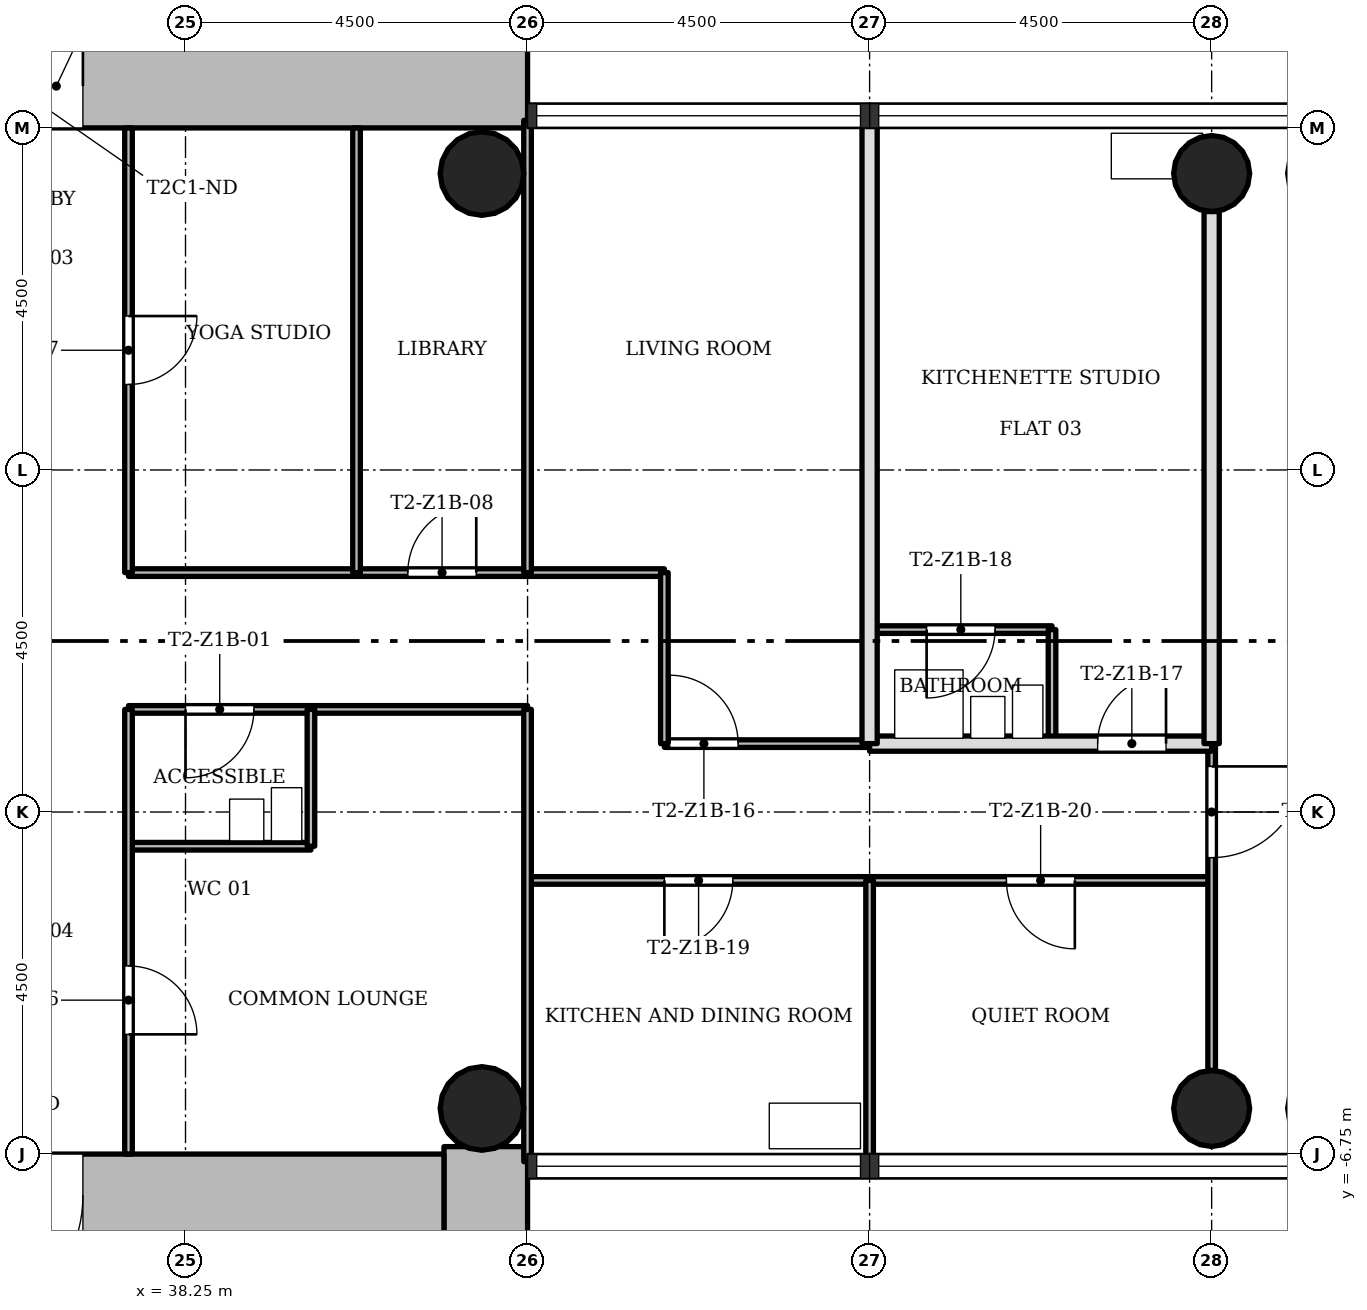
"""IFC4 building model, lengths in metres.
Left out: names, types, materials, properties, quantities, classifications, styles, units other than length and angle.
Written with IfcOpenShell. Run it as: python <this file> out.ifc"""

import sys

from ifc_helpers import new_model, si_unit, direction, frame, frame_2d, origin, origin_2d, place, context, subcontext, project, spatial, rectangle, hollow_circle, extrude, element, fill, save


model = new_model("IFC4")
c1 = context("Model", 3, precision=1e-05, world=origin(), true_north=direction((0.0, 1.0)))
c2 = subcontext(c1, "Body", "Model", "MODEL_VIEW")
j1 = project(units=[si_unit("LENGTHUNIT", "METRE"), si_unit("PLANEANGLEUNIT", "RADIAN")], contexts=[c1])
p1 = place(None, origin())
s1 = spatial("IfcSite", under=j1, at=p1, CompositionType="ELEMENT")
p2 = place(p1, origin())
s2 = spatial("IfcBuilding", under=s1, at=p2, CompositionType="ELEMENT")
p3 = place(p2, frame((0.0, 0.0, 41.5)))
s3 = spatial("IfcBuildingStorey", under=s2, at=p3, CompositionType="ELEMENT", Elevation=41.5)
p4 = place(p3, frame((30.35, 7.3, 0.0), z_axis=(0.0, 0.0, 1.0), x_axis=(1.0, 0.0, 0.0)))
e1 = element("IfcWall", 1, at=p4, inside=s3, PredefinedType="SHEAR", context=c2, shape_type="SweptSolid", body=[
    extrude(rectangle(XDim=12.4, YDim=1.1, at=frame_2d((6.2, 0.0))), origin(), (0.0, 0.0, 1.0), 3.4),
])
p5 = place(p4, frame((4.75, 0.0, 0.0)))
e2 = element("IfcOpeningElement", 2, at=p5, cuts=e1, PredefinedType="OPENING", context=c2, shape_type="SweptSolid", body=[
    extrude(rectangle(XDim=1.8, YDim=2.1, at=frame_2d((0.9, 1.05))), frame((0.0, 0.56, 0.0), z_axis=(0.0, -1.0, 0.0), x_axis=(1.0, 0.0, 0.0)), (0.0, 0.0, 1.0), 1.12),
])
p6 = place(p3, frame((42.2, -15.248, 0.0), z_axis=(0.0, 0.0, 1.0), x_axis=(0.0, 1.0, 0.0)))
e3 = element("IfcWall", 3, at=p6, inside=s3, PredefinedType="SHEAR", context=c2, shape_type="SweptSolid", body=[
    extrude(rectangle(XDim=8.596, YDim=1.1, at=frame_2d((4.298, 0.0))), origin(), (0.0, 0.0, 1.0), 3.4),
])
p7 = place(p3, frame((41.65, -7.3, 0.0), z_axis=(0.0, 0.0, 1.0), x_axis=(-1.0, 0.0, 0.0)))
e4 = element("IfcWall", 4, at=p7, inside=s3, PredefinedType="SHEAR", context=c2, shape_type="SweptSolid", body=[
    extrude(rectangle(XDim=12.4, YDim=1.1, at=frame_2d((6.2, 0.0))), origin(), (0.0, 0.0, 1.0), 3.4),
])
p8 = place(p7, frame((4.75, 0.0, 0.0)))
e5 = element("IfcOpeningElement", 5, at=p8, cuts=e4, PredefinedType="OPENING", context=c2, shape_type="SweptSolid", body=[
    extrude(rectangle(XDim=1.8, YDim=2.1, at=frame_2d((0.9, 1.05))), frame((0.0, 0.56, 0.0), z_axis=(0.0, -1.0, 0.0), x_axis=(1.0, 0.0, 0.0)), (0.0, 0.0, 1.0), 1.12),
])
for number, where, z_axis, x_axis in (
    (6, (51.75, -6.15, 0.0), (0.0, 0.0, 1.0), (1.0, 0.0, 0.0)),
    (7, (51.75, 6.15, 0.0), (0.0, 0.0, 1.0), (1.0, 0.0, 0.0)),
):
    element("IfcColumn", number, at=place(p3, frame(where, z_axis=z_axis, x_axis=x_axis)), inside=s3, PredefinedType="COLUMN", context=c2, shape_type="SweptSolid", body=[
        extrude(hollow_circle(Radius=0.5, WallThickness=0.036, at=origin_2d()), origin(), (0.0, 0.0, 1.0), 3.4),
    ])
for number, where, z_axis, x_axis in (
    (8, (42.15, -6.15, 0.0), (0.0, 0.0, 1.0), (1.0, 0.0, 0.0)),
    (9, (42.15, 6.15, 0.0), (0.0, 0.0, 1.0), (1.0, 0.0, 0.0)),
):
    element("IfcColumn", number, at=place(p3, frame(where, z_axis=z_axis, x_axis=x_axis)), inside=s3, PredefinedType="COLUMN", context=c2, shape_type="SweptSolid", body=[
        extrude(hollow_circle(Radius=0.55, WallThickness=0.04, at=origin_2d()), origin(), (0.0, 0.0, 1.0), 3.4),
    ])
p9 = place(p3, frame((51.75, -3.15, 0.0), z_axis=(0.0, 0.0, 1.0), x_axis=(-1.0, 0.0, 0.0)))
e10 = element("IfcWall", 10, at=p9, inside=s3, PredefinedType="PARTITIONING", context=c2, shape_type="SweptSolid", body=[
    extrude(rectangle(XDim=9.0, YDim=0.1, at=frame_2d((4.5, 0.0))), origin(), (0.0, 0.0, 1.0), 3.0),
])
p10 = place(p9, frame((6.3, 0.0, 0.0)))
e11 = element("IfcOpeningElement", 11, at=p10, cuts=e10, PredefinedType="OPENING", context=c2, shape_type="SweptSolid", body=[
    extrude(rectangle(XDim=0.9, YDim=2.1, at=frame_2d((0.45, 1.05))), frame((0.0, 0.06, 0.0), z_axis=(0.0, -1.0, 0.0), x_axis=(1.0, 0.0, 0.0)), (0.0, 0.0, 1.0), 0.12),
])
p11 = place(p9, frame((1.8, 0.0, 0.0)))
e12 = element("IfcOpeningElement", 12, at=p11, cuts=e10, PredefinedType="OPENING", context=c2, shape_type="SweptSolid", body=[
    extrude(rectangle(XDim=0.9, YDim=2.1, at=frame_2d((0.45, 1.05))), frame((0.0, 0.06, 0.0), z_axis=(0.0, -1.0, 0.0), x_axis=(1.0, 0.0, 0.0)), (0.0, 0.0, 1.0), 0.12),
])
p12 = place(p3, frame((39.9, -2.7, 0.0), z_axis=(0.0, 0.0, 1.0), x_axis=(-1.0, 0.0, 0.0)))
e13 = element("IfcWall", 13, at=p12, inside=s3, PredefinedType="PARTITIONING", context=c2, shape_type="SweptSolid", body=[
    extrude(rectangle(XDim=2.4, YDim=0.1, at=frame_2d((1.2, 0.0))), origin(), (0.0, 0.0, 1.0), 3.0),
])
p13 = place(p3, frame((47.25, -1.35, 0.0), z_axis=(0.0, 0.0, 1.0), x_axis=(-1.0, 0.0, 0.0)))
e14 = element("IfcWall", 14, at=p13, inside=s3, PredefinedType="PARTITIONING", context=c2, shape_type="SweptSolid", body=[
    extrude(rectangle(XDim=2.7, YDim=0.1, at=frame_2d((1.35, 0.0))), origin(), (0.0, 0.0, 1.0), 3.0),
])
p14 = place(p13, frame((1.73, 0.0, 0.0)))
e15 = element("IfcOpeningElement", 15, at=p14, cuts=e14, PredefinedType="OPENING", context=c2, shape_type="SweptSolid", body=[
    extrude(rectangle(XDim=0.9, YDim=2.1, at=frame_2d((0.45, 1.05))), frame((0.0, 0.06, 0.0), z_axis=(0.0, -1.0, 0.0), x_axis=(1.0, 0.0, 0.0)), (0.0, 0.0, 1.0), 0.12),
])
p15 = place(p3, frame((51.75, -1.35, 0.0), z_axis=(0.0, 0.0, 1.0), x_axis=(-1.0, 0.0, 0.0)))
e16 = element("IfcWall", 16, at=p15, inside=s3, PredefinedType="SOLIDWALL", context=c2, shape_type="SweptSolid", body=[
    extrude(rectangle(XDim=4.5, YDim=0.2, at=frame_2d((2.25, 0.0))), origin(), (0.0, 0.0, 1.0), 3.0),
])
p16 = place(p15, frame((0.6, 0.0, 0.0)))
e17 = element("IfcOpeningElement", 17, at=p16, cuts=e16, PredefinedType="OPENING", context=c2, shape_type="SweptSolid", body=[
    extrude(rectangle(XDim=0.9, YDim=2.1, at=frame_2d((0.45, 1.05))), frame((0.0, 0.11, 0.0), z_axis=(0.0, -1.0, 0.0), x_axis=(1.0, 0.0, 0.0)), (0.0, 0.0, 1.0), 0.22),
])
p17 = place(p3, frame((42.75, -0.9, 0.0), z_axis=(0.0, 0.0, 1.0), x_axis=(-1.0, 0.0, 0.0)))
e18 = element("IfcWall", 18, at=p17, inside=s3, PredefinedType="PARTITIONING", context=c2, shape_type="SweptSolid", body=[
    extrude(rectangle(XDim=5.25, YDim=0.1, at=frame_2d((2.625, 0.0))), origin(), (0.0, 0.0, 1.0), 3.0),
])
p18 = place(p17, frame((3.6, 0.0, 0.0)))
e19 = element("IfcOpeningElement", 19, at=p18, cuts=e18, PredefinedType="OPENING", context=c2, shape_type="SweptSolid", body=[
    extrude(rectangle(XDim=0.9, YDim=2.1, at=frame_2d((0.45, 1.05))), frame((0.0, 0.06, 0.0), z_axis=(0.0, -1.0, 0.0), x_axis=(1.0, 0.0, 0.0)), (0.0, 0.0, 1.0), 0.12),
])
p19 = place(p3, frame((49.65, 0.15, 0.0), z_axis=(0.0, 0.0, 1.0), x_axis=(-1.0, 0.0, 0.0)))
e20 = element("IfcWall", 20, at=p19, inside=s3, PredefinedType="PARTITIONING", context=c2, shape_type="SweptSolid", body=[
    extrude(rectangle(XDim=2.4, YDim=0.1, at=frame_2d((1.2, 0.0))), origin(), (0.0, 0.0, 1.0), 3.0),
])
p20 = place(p19, frame((0.75, 0.0, 0.0)))
e21 = element("IfcOpeningElement", 21, at=p20, cuts=e20, PredefinedType="OPENING", context=c2, shape_type="SweptSolid", body=[
    extrude(rectangle(XDim=0.9, YDim=2.1, at=frame_2d((0.45, 1.05))), frame((0.0, 0.06, 0.0), z_axis=(0.0, -1.0, 0.0), x_axis=(1.0, 0.0, 0.0)), (0.0, 0.0, 1.0), 0.12),
])
p21 = place(p3, frame((44.55, 0.9, 0.0), z_axis=(0.0, 0.0, 1.0), x_axis=(-1.0, 0.0, 0.0)))
e22 = element("IfcWall", 22, at=p21, inside=s3, PredefinedType="PARTITIONING", context=c2, shape_type="SweptSolid", body=[
    extrude(rectangle(XDim=7.05, YDim=0.1, at=frame_2d((3.525, 0.0))), origin(), (0.0, 0.0, 1.0), 3.0),
])
p22 = place(p21, frame((2.475, 0.0, 0.0)))
e23 = element("IfcOpeningElement", 23, at=p22, cuts=e22, PredefinedType="OPENING", context=c2, shape_type="SweptSolid", body=[
    extrude(rectangle(XDim=0.9, YDim=2.1, at=frame_2d((0.45, 1.05))), frame((0.0, 0.06, 0.0), z_axis=(0.0, -1.0, 0.0), x_axis=(1.0, 0.0, 0.0)), (0.0, 0.0, 1.0), 0.12),
])
p23 = place(p3, frame((51.75, -5.65, 0.0), z_axis=(0.0, 0.0, 1.0), x_axis=(0.0, 1.0, 0.0)))
e24 = element("IfcWall", 24, at=p23, inside=s3, PredefinedType="PARTITIONING", context=c2, shape_type="SweptSolid", body=[
    extrude(rectangle(XDim=4.3, YDim=0.1, at=frame_2d((2.15, 0.0))), origin(), (0.0, 0.0, 1.0), 3.0),
])
p24 = place(p23, frame((2.8, 0.0, 0.0)))
e25 = element("IfcOpeningElement", 25, at=p24, cuts=e24, PredefinedType="OPENING", context=c2, shape_type="SweptSolid", body=[
    extrude(rectangle(XDim=1.2, YDim=2.1, at=frame_2d((0.6, 1.05))), frame((0.0, 0.06, 0.0), z_axis=(0.0, -1.0, 0.0), x_axis=(1.0, 0.0, 0.0)), (0.0, 0.0, 1.0), 0.12),
])
p25 = place(p3, frame((51.75, -1.35, 0.0), z_axis=(0.0, 0.0, 1.0), x_axis=(0.0, 1.0, 0.0)))
e26 = element("IfcWall", 26, at=p25, inside=s3, PredefinedType="SOLIDWALL", context=c2, shape_type="SweptSolid", body=[
    extrude(rectangle(XDim=7.0, YDim=0.2, at=frame_2d((3.5, 0.0))), origin(), (0.0, 0.0, 1.0), 3.0),
])
p26 = place(p3, frame((49.65, -1.35, 0.0), z_axis=(0.0, 0.0, 1.0), x_axis=(0.0, 1.0, 0.0)))
e27 = element("IfcWall", 27, at=p26, inside=s3, PredefinedType="PARTITIONING", context=c2, shape_type="SweptSolid", body=[
    extrude(rectangle(XDim=1.5, YDim=0.1, at=frame_2d((0.75, 0.0))), origin(), (0.0, 0.0, 1.0), 3.0),
])
p27 = place(p3, frame((47.25, -6.85, 0.0), z_axis=(0.0, 0.0, 1.0), x_axis=(0.0, 1.0, 0.0)))
e28 = element("IfcWall", 28, at=p27, inside=s3, PredefinedType="PARTITIONING", context=c2, shape_type="SweptSolid", body=[
    extrude(rectangle(XDim=3.7, YDim=0.1, at=frame_2d((1.85, 0.0))), origin(), (0.0, 0.0, 1.0), 3.0),
])
p28 = place(p3, frame((47.25, -1.35, 0.0), z_axis=(0.0, 0.0, 1.0), x_axis=(0.0, 1.0, 0.0)))
e29 = element("IfcWall", 29, at=p28, inside=s3, PredefinedType="SOLIDWALL", context=c2, shape_type="SweptSolid", body=[
    extrude(rectangle(XDim=8.2, YDim=0.2, at=frame_2d((4.1, 0.0))), origin(), (0.0, 0.0, 1.0), 3.0),
])
p29 = place(p3, frame((44.55, -1.35, 0.0), z_axis=(0.0, 0.0, 1.0), x_axis=(0.0, 1.0, 0.0)))
e30 = element("IfcWall", 30, at=p29, inside=s3, PredefinedType="PARTITIONING", context=c2, shape_type="SweptSolid", body=[
    extrude(rectangle(XDim=2.25, YDim=0.1, at=frame_2d((1.125, 0.0))), origin(), (0.0, 0.0, 1.0), 3.0),
])
for number, where, z_axis, x_axis in (
    (31, (42.75, -6.85, 0.0), (0.0, 0.0, 1.0), (0.0, 1.0, 0.0)),
    (32, (42.75, 0.9, 0.0), (0.0, 0.0, 1.0), (0.0, 1.0, 0.0)),
):
    element("IfcWall", number, at=place(p3, frame(where, z_axis=z_axis, x_axis=x_axis)), inside=s3, PredefinedType="PARTITIONING", context=c2, shape_type="SweptSolid", body=[
        extrude(rectangle(XDim=5.95, YDim=0.1, at=frame_2d((2.975, 0.0))), origin(), (0.0, 0.0, 1.0), 3.0),
    ])
p30 = place(p3, frame((40.5, 0.9, 0.0), z_axis=(0.0, 0.0, 1.0), x_axis=(0.0, 1.0, 0.0)))
e33 = element("IfcWall", 33, at=p30, inside=s3, PredefinedType="PARTITIONING", context=c2, shape_type="SweptSolid", body=[
    extrude(rectangle(XDim=5.85, YDim=0.1, at=frame_2d((2.925, 0.0))), origin(), (0.0, 0.0, 1.0), 3.0),
])
p31 = place(p3, frame((39.9, -2.7, 0.0), z_axis=(0.0, 0.0, 1.0), x_axis=(0.0, 1.0, 0.0)))
e34 = element("IfcWall", 34, at=p31, inside=s3, PredefinedType="PARTITIONING", context=c2, shape_type="SweptSolid", body=[
    extrude(rectangle(XDim=1.8, YDim=0.1, at=frame_2d((0.9, 0.0))), origin(), (0.0, 0.0, 1.0), 3.0),
])
p32 = place(p3, frame((37.5, -6.75, 0.0), z_axis=(0.0, 0.0, 1.0), x_axis=(0.0, 1.0, 0.0)))
e35 = element("IfcWall", 35, at=p32, inside=s3, PredefinedType="PARTITIONING", context=c2, shape_type="SweptSolid", body=[
    extrude(rectangle(XDim=5.85, YDim=0.1, at=frame_2d((2.925, 0.0))), origin(), (0.0, 0.0, 1.0), 3.0),
])
p33 = place(p32, frame((1.575, 0.0, 0.0)))
e36 = element("IfcOpeningElement", 36, at=p33, cuts=e35, PredefinedType="OPENING", context=c2, shape_type="SweptSolid", body=[
    extrude(rectangle(XDim=0.9, YDim=2.1, at=frame_2d((0.45, 1.05))), frame((0.0, 0.06, 0.0), z_axis=(0.0, -1.0, 0.0), x_axis=(1.0, 0.0, 0.0)), (0.0, 0.0, 1.0), 0.12),
])
p34 = place(p3, frame((37.5, 0.9, 0.0), z_axis=(0.0, 0.0, 1.0), x_axis=(0.0, 1.0, 0.0)))
e37 = element("IfcWall", 37, at=p34, inside=s3, PredefinedType="PARTITIONING", context=c2, shape_type="SweptSolid", body=[
    extrude(rectangle(XDim=5.85, YDim=0.1, at=frame_2d((2.925, 0.0))), origin(), (0.0, 0.0, 1.0), 3.0),
])
p35 = place(p34, frame((2.475, 0.0, 0.0)))
e38 = element("IfcOpeningElement", 38, at=p35, cuts=e37, PredefinedType="OPENING", context=c2, shape_type="SweptSolid", body=[
    extrude(rectangle(XDim=0.9, YDim=2.1, at=frame_2d((0.45, 1.05))), frame((0.0, 0.06, 0.0), z_axis=(0.0, -1.0, 0.0), x_axis=(1.0, 0.0, 0.0)), (0.0, 0.0, 1.0), 0.12),
])
p36 = place(p18, origin())
e39 = element("IfcDoor", 39, at=p36, inside=s3, OperationType="SINGLE_SWING_LEFT", PredefinedType="DOOR", context=c2, shape_type="SweptSolid", body=[
    extrude(rectangle(XDim=0.9, YDim=2.1, at=frame_2d((0.45, 1.05))), frame((0.0, 0.025, 0.0), z_axis=(0.0, -1.0, 0.0), x_axis=(1.0, 0.0, 0.0)), (0.0, 0.0, 1.0), 0.05),
])
fill(e19, e39)
p37 = place(p33, origin())
e40 = element("IfcDoor", 40, at=p37, inside=s3, OperationType="SINGLE_SWING_LEFT", PredefinedType="DOOR", context=c2, shape_type="SweptSolid", body=[
    extrude(rectangle(XDim=0.9, YDim=2.1, at=frame_2d((0.45, 1.05))), frame((0.0, 0.025, 0.0), z_axis=(0.0, -1.0, 0.0), x_axis=(1.0, 0.0, 0.0)), (0.0, 0.0, 1.0), 0.05),
])
fill(e36, e40)
p38 = place(p35, origin())
e41 = element("IfcDoor", 41, at=p38, inside=s3, OperationType="SINGLE_SWING_RIGHT", PredefinedType="DOOR", context=c2, shape_type="SweptSolid", body=[
    extrude(rectangle(XDim=0.9, YDim=2.1, at=frame_2d((0.45, 1.05))), frame((0.0, 0.025, 0.0), z_axis=(0.0, -1.0, 0.0), x_axis=(1.0, 0.0, 0.0)), (0.0, 0.0, 1.0), 0.05),
])
fill(e38, e41)
p39 = place(p22, origin())
e42 = element("IfcDoor", 42, at=p39, inside=s3, OperationType="SINGLE_SWING_LEFT", PredefinedType="DOOR", context=c2, shape_type="SweptSolid", body=[
    extrude(rectangle(XDim=0.9, YDim=2.1, at=frame_2d((0.45, 1.05))), frame((0.0, 0.025, 0.0), z_axis=(0.0, -1.0, 0.0), x_axis=(1.0, 0.0, 0.0)), (0.0, 0.0, 1.0), 0.05),
])
fill(e23, e42)
p40 = place(p14, origin())
e43 = element("IfcDoor", 43, at=p40, inside=s3, OperationType="SINGLE_SWING_RIGHT", PredefinedType="DOOR", context=c2, shape_type="SweptSolid", body=[
    extrude(rectangle(XDim=0.9, YDim=2.1, at=frame_2d((0.45, 1.05))), frame((0.0, 0.025, 0.0), z_axis=(0.0, -1.0, 0.0), x_axis=(1.0, 0.0, 0.0)), (0.0, 0.0, 1.0), 0.05),
])
fill(e15, e43)
p41 = place(p16, origin())
e44 = element("IfcDoor", 44, at=p41, inside=s3, OperationType="SINGLE_SWING_LEFT", PredefinedType="DOOR", context=c2, shape_type="SweptSolid", body=[
    extrude(rectangle(XDim=0.9, YDim=2.1, at=frame_2d((0.45, 1.05))), frame((0.0, 0.025, 0.0), z_axis=(0.0, -1.0, 0.0), x_axis=(1.0, 0.0, 0.0)), (0.0, 0.0, 1.0), 0.05),
])
fill(e17, e44)
p42 = place(p20, origin())
e45 = element("IfcDoor", 45, at=p42, inside=s3, OperationType="SINGLE_SWING_LEFT", PredefinedType="DOOR", context=c2, shape_type="SweptSolid", body=[
    extrude(rectangle(XDim=0.9, YDim=2.1, at=frame_2d((0.45, 1.05))), frame((0.0, 0.025, 0.0), z_axis=(0.0, -1.0, 0.0), x_axis=(1.0, 0.0, 0.0)), (0.0, 0.0, 1.0), 0.05),
])
fill(e21, e45)
p43 = place(p10, origin())
e46 = element("IfcDoor", 46, at=p43, inside=s3, OperationType="SINGLE_SWING_LEFT", PredefinedType="DOOR", context=c2, shape_type="SweptSolid", body=[
    extrude(rectangle(XDim=0.9, YDim=2.1, at=frame_2d((0.45, 1.05))), frame((0.0, 0.025, 0.0), z_axis=(0.0, -1.0, 0.0), x_axis=(1.0, 0.0, 0.0)), (0.0, 0.0, 1.0), 0.05),
])
fill(e11, e46)
p44 = place(p11, origin())
e47 = element("IfcDoor", 47, at=p44, inside=s3, OperationType="SINGLE_SWING_RIGHT", PredefinedType="DOOR", context=c2, shape_type="SweptSolid", body=[
    extrude(rectangle(XDim=0.9, YDim=2.1, at=frame_2d((0.45, 1.05))), frame((0.0, 0.025, 0.0), z_axis=(0.0, -1.0, 0.0), x_axis=(1.0, 0.0, 0.0)), (0.0, 0.0, 1.0), 0.05),
])
fill(e12, e47)
p45 = place(p24, origin())
e48 = element("IfcDoor", 48, at=p45, inside=s3, OperationType="SINGLE_SWING_RIGHT", PredefinedType="DOOR", context=c2, shape_type="SweptSolid", body=[
    extrude(rectangle(XDim=1.2, YDim=2.1, at=frame_2d((0.6, 1.05))), frame((0.0, 0.025, 0.0), z_axis=(0.0, -1.0, 0.0), x_axis=(1.0, 0.0, 0.0)), (0.0, 0.0, 1.0), 0.05),
])
fill(e25, e48)
p46 = place(p5, origin())
e49 = element("IfcDoor", 49, at=p46, inside=s3, OperationType="SINGLE_SWING_LEFT", PredefinedType="DOOR", context=c2, shape_type="SweptSolid", body=[
    extrude(rectangle(XDim=1.8, YDim=2.1, at=frame_2d((0.9, 1.05))), frame((0.0, 0.025, 0.0), z_axis=(0.0, -1.0, 0.0), x_axis=(1.0, 0.0, 0.0)), (0.0, 0.0, 1.0), 0.05),
])
fill(e2, e49)
p47 = place(p8, origin())
e50 = element("IfcDoor", 50, at=p47, inside=s3, OperationType="SINGLE_SWING_LEFT", PredefinedType="DOOR", context=c2, shape_type="SweptSolid", body=[
    extrude(rectangle(XDim=1.8, YDim=2.1, at=frame_2d((0.9, 1.05))), frame((0.0, 0.025, 0.0), z_axis=(0.0, -1.0, 0.0), x_axis=(1.0, 0.0, 0.0)), (0.0, 0.0, 1.0), 0.05),
])
fill(e5, e50)
save(model, sys.argv[1])
